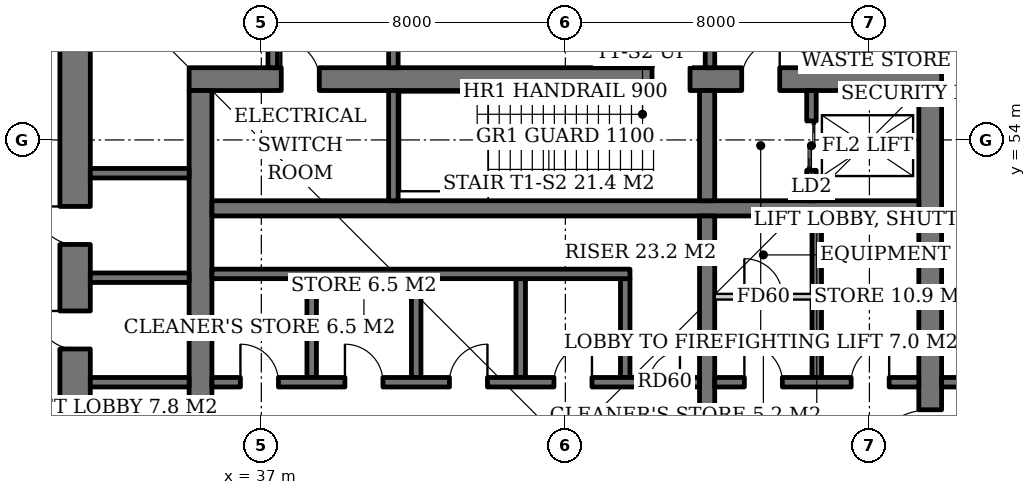
"""IFC4 building model, lengths in metres.
Left out: names, types, materials, properties, quantities, classifications, styles, units other than length and angle.
Written with IfcOpenShell. Run it as: python <this file> out.ifc"""

import sys

from ifc_helpers import new_model, si_unit, direction, frame, frame_2d, origin, place, context, subcontext, project, spatial, rectangle, extrude, element, fill, save


model = new_model("IFC4")
c1 = context("Model", 3, precision=1e-05, world=origin(), true_north=direction((0.0, 1.0)))
c2 = subcontext(c1, "Body", "Model", "MODEL_VIEW")
j1 = project(units=[si_unit("LENGTHUNIT", "METRE"), si_unit("PLANEANGLEUNIT", "RADIAN")], contexts=[c1])
p1 = place(None, origin())
s1 = spatial("IfcSite", under=j1, at=p1, CompositionType="ELEMENT")
p2 = place(p1, origin())
s2 = spatial("IfcBuilding", under=s1, at=p2, CompositionType="ELEMENT")
p3 = place(p2, frame((0.0, 0.0, -10.0)))
s3 = spatial("IfcBuildingStorey", under=s2, at=p3, CompositionType="ELEMENT", Elevation=-10.0)
p4 = place(p3, frame((35.1, 55.6, 0.0), z_axis=(0.0, 0.0, 1.0), x_axis=(1.0, 0.0, 0.0)))
e1 = element("IfcWall", 1, at=p4, inside=s3, PredefinedType="SHEAR", context=c2, shape_type="SweptSolid", body=[
    extrude(rectangle(XDim=19.8, YDim=0.6, at=frame_2d((9.9, 0.0))), origin(), (0.0, 0.0, 1.0), 5.0),
])
p5 = place(p4, frame((14.54, 0.0, 0.0)))
e2 = element("IfcOpeningElement", 2, at=p5, cuts=e1, PredefinedType="OPENING", context=c2, shape_type="SweptSolid", body=[
    extrude(rectangle(XDim=1.0, YDim=2.1, at=frame_2d((0.5, 1.05))), frame((0.0, 0.31, 0.0), z_axis=(0.0, -1.0, 0.0), x_axis=(1.0, 0.0, 0.0)), (0.0, 0.0, 1.0), 0.62),
])
p6 = place(p4, frame((12.18, 0.0, 0.0)))
e3 = element("IfcOpeningElement", 3, at=p6, cuts=e1, PredefinedType="OPENING", context=c2, shape_type="SweptSolid", body=[
    extrude(rectangle(XDim=1.0, YDim=2.1, at=frame_2d((0.5, 1.05))), frame((0.0, 0.31, 0.0), z_axis=(0.0, -1.0, 0.0), x_axis=(1.0, 0.0, 0.0)), (0.0, 0.0, 1.0), 0.62),
])
p7 = place(p4, frame((2.425, 0.0, 0.0)))
e4 = element("IfcOpeningElement", 4, at=p7, cuts=e1, PredefinedType="OPENING", context=c2, shape_type="SweptSolid", body=[
    extrude(rectangle(XDim=1.0, YDim=2.1, at=frame_2d((0.5, 1.05))), frame((0.0, 0.31, 0.0), z_axis=(0.0, -1.0, 0.0), x_axis=(1.0, 0.0, 0.0)), (0.0, 0.0, 1.0), 0.62),
])
p8 = place(p3, frame((35.4, 36.7, 0.0), z_axis=(0.0, 0.0, 1.0), x_axis=(0.0, 1.0, 0.0)))
e5 = element("IfcWall", 5, at=p8, inside=s3, PredefinedType="SHEAR", context=c2, shape_type="SweptSolid", body=[
    extrude(rectangle(XDim=18.6, YDim=0.6, at=frame_2d((9.3, 0.0))), origin(), (0.0, 0.0, 1.0), 5.0),
])
p9 = place(p8, frame((8.4, 0.0, 0.0)))
e6 = element("IfcOpeningElement", 6, at=p9, cuts=e5, PredefinedType="OPENING", context=c2, shape_type="SweptSolid", body=[
    extrude(rectangle(XDim=1.8, YDim=2.4, at=frame_2d((0.9, 1.2))), frame((0.0, 0.31, 0.0), z_axis=(0.0, -1.0, 0.0), x_axis=(1.0, 0.0, 0.0)), (0.0, 0.0, 1.0), 0.62),
])
p10 = place(p3, frame((54.6, 36.7, 0.0), z_axis=(0.0, 0.0, 1.0), x_axis=(0.0, 1.0, 0.0)))
e7 = element("IfcWall", 7, at=p10, inside=s3, PredefinedType="SHEAR", context=c2, shape_type="SweptSolid", body=[
    extrude(rectangle(XDim=18.6, YDim=0.6, at=frame_2d((9.3, 0.0))), origin(), (0.0, 0.0, 1.0), 5.0),
])
p11 = place(p10, frame((8.4, 0.0, 0.0)))
e8 = element("IfcOpeningElement", 8, at=p11, cuts=e7, PredefinedType="OPENING", context=c2, shape_type="SweptSolid", body=[
    extrude(rectangle(XDim=1.8, YDim=2.4, at=frame_2d((0.9, 1.2))), frame((0.0, 0.31, 0.0), z_axis=(0.0, -1.0, 0.0), x_axis=(1.0, 0.0, 0.0)), (0.0, 0.0, 1.0), 0.62),
])
p12 = place(p3, frame((32.1, 33.5, 0.0), z_axis=(0.0, 0.0, 1.0), x_axis=(0.0, 1.0, 0.0)))
e9 = element("IfcWall", 9, at=p12, inside=s3, PredefinedType="SHEAR", context=c2, shape_type="SweptSolid", body=[
    extrude(rectangle(XDim=25.0, YDim=0.8, at=frame_2d((12.5, 0.0))), origin(), (0.0, 0.0, 1.0), 5.0),
])
p13 = place(p12, frame((11.6, 0.0, 0.0)))
e10 = element("IfcOpeningElement", 10, at=p13, cuts=e9, PredefinedType="OPENING", context=c2, shape_type="SweptSolid", body=[
    extrude(rectangle(XDim=1.8, YDim=2.4, at=frame_2d((0.9, 1.2))), frame((0.0, 0.41, 0.0), z_axis=(0.0, -1.0, 0.0), x_axis=(1.0, 0.0, 0.0)), (0.0, 0.0, 1.0), 0.82),
])
p14 = place(p12, frame((3.5, 0.0, 0.0)))
e11 = element("IfcOpeningElement", 11, at=p14, cuts=e9, PredefinedType="OPENING", context=c2, shape_type="SweptSolid", body=[
    extrude(rectangle(XDim=1.0, YDim=2.1, at=frame_2d((0.5, 1.05))), frame((0.0, 0.41, 0.0), z_axis=(0.0, -1.0, 0.0), x_axis=(1.0, 0.0, 0.0)), (0.0, 0.0, 1.0), 0.82),
])
p15 = place(p12, frame((6.25, 0.0, 0.0)))
e12 = element("IfcOpeningElement", 12, at=p15, cuts=e9, PredefinedType="OPENING", context=c2, shape_type="SweptSolid", body=[
    extrude(rectangle(XDim=1.0, YDim=2.1, at=frame_2d((0.5, 1.05))), frame((0.0, 0.41, 0.0), z_axis=(0.0, -1.0, 0.0), x_axis=(1.0, 0.0, 0.0)), (0.0, 0.0, 1.0), 0.82),
])
p16 = place(p12, frame((9.0, 0.0, 0.0)))
e13 = element("IfcOpeningElement", 13, at=p16, cuts=e9, PredefinedType="OPENING", context=c2, shape_type="SweptSolid", body=[
    extrude(rectangle(XDim=1.0, YDim=2.1, at=frame_2d((0.5, 1.05))), frame((0.0, 0.41, 0.0), z_axis=(0.0, -1.0, 0.0), x_axis=(1.0, 0.0, 0.0)), (0.0, 0.0, 1.0), 0.82),
])
p17 = place(p12, frame((15.0, 0.0, 0.0)))
e14 = element("IfcOpeningElement", 14, at=p17, cuts=e9, PredefinedType="OPENING", context=c2, shape_type="SweptSolid", body=[
    extrude(rectangle(XDim=1.0, YDim=2.1, at=frame_2d((0.5, 1.05))), frame((0.0, 0.41, 0.0), z_axis=(0.0, -1.0, 0.0), x_axis=(1.0, 0.0, 0.0)), (0.0, 0.0, 1.0), 0.82),
])
p18 = place(p12, frame((17.75, 0.0, 0.0)))
e15 = element("IfcOpeningElement", 15, at=p18, cuts=e9, PredefinedType="OPENING", context=c2, shape_type="SweptSolid", body=[
    extrude(rectangle(XDim=1.0, YDim=2.1, at=frame_2d((0.5, 1.05))), frame((0.0, 0.41, 0.0), z_axis=(0.0, -1.0, 0.0), x_axis=(1.0, 0.0, 0.0)), (0.0, 0.0, 1.0), 0.82),
])
p19 = place(p3, frame((35.7, 52.2, 0.0), z_axis=(0.0, 0.0, 1.0), x_axis=(1.0, 0.0, 0.0)))
e16 = element("IfcWall", 16, at=p19, inside=s3, PredefinedType="SHEAR", context=c2, shape_type="SweptSolid", body=[
    extrude(rectangle(XDim=18.6, YDim=0.4, at=frame_2d((9.3, 0.0))), origin(), (0.0, 0.0, 1.0), 5.0),
])
p20 = place(p3, frame((48.73, 40.0, 0.0), z_axis=(0.0, 0.0, 1.0), x_axis=(0.0, 1.0, 0.0)))
e17 = element("IfcWall", 17, at=p20, inside=s3, PredefinedType="SHEAR", context=c2, shape_type="SweptSolid", body=[
    extrude(rectangle(XDim=12.0, YDim=0.4, at=frame_2d((6.0, 0.0))), origin(), (0.0, 0.0, 1.0), 5.0),
])
p21 = place(p3, frame((48.73, 52.4, 0.0), z_axis=(0.0, 0.0, 1.0), x_axis=(0.0, 1.0, 0.0)))
e18 = element("IfcWall", 18, at=p21, inside=s3, PredefinedType="SHEAR", context=c2, shape_type="SweptSolid", body=[
    extrude(rectangle(XDim=2.9, YDim=0.4, at=frame_2d((1.45, 0.0))), origin(), (0.0, 0.0, 1.0), 5.0),
])
p22 = place(p3, frame((40.475, 52.4, 0.0), z_axis=(0.0, 0.0, 1.0), x_axis=(0.0, 1.0, 0.0)))
e19 = element("IfcWall", 19, at=p22, inside=s3, PredefinedType="SHEAR", context=c2, shape_type="SweptSolid", body=[
    extrude(rectangle(XDim=2.9, YDim=0.25, at=frame_2d((1.45, 0.0))), origin(), (0.0, 0.0, 1.0), 5.0),
])
p23 = place(p3, frame((51.475, 52.4, 0.0), z_axis=(0.0, 0.0, 1.0), x_axis=(0.0, 1.0, 0.0)))
e20 = element("IfcWall", 20, at=p23, inside=s3, PredefinedType="SHEAR", context=c2, shape_type="SweptSolid", body=[
    extrude(rectangle(XDim=2.9, YDim=0.25, at=frame_2d((1.45, 0.0))), origin(), (0.0, 0.0, 1.0), 5.0),
])
p24 = place(p23, frame((0.8, 0.0, 0.0)))
e21 = element("IfcOpeningElement", 21, at=p24, cuts=e20, PredefinedType="OPENING", context=c2, shape_type="SweptSolid", body=[
    extrude(rectangle(XDim=1.3, YDim=2.2, at=frame_2d((0.65, 1.1))), frame((0.0, 0.135, 0.0), z_axis=(0.0, -1.0, 0.0), x_axis=(1.0, 0.0, 0.0)), (0.0, 0.0, 1.0), 0.27),
])
for number, where, z_axis, x_axis in (
    (22, (38.325, 47.75, 0.0), (0.0, 0.0, 1.0), (0.0, 1.0, 0.0)),
    (23, (41.075, 47.75, 0.0), (0.0, 0.0, 1.0), (0.0, 1.0, 0.0)),
    (24, (43.825, 47.75, 0.0), (0.0, 0.0, 1.0), (0.0, 1.0, 0.0)),
    (25, (46.575, 47.75, 0.0), (0.0, 0.0, 1.0), (0.0, 1.0, 0.0)),
):
    element("IfcWall", number, at=place(p3, frame(where, z_axis=z_axis, x_axis=x_axis)), inside=s3, PredefinedType="SHEAR", context=c2, shape_type="SweptSolid", body=[
        extrude(rectangle(XDim=2.6, YDim=0.25, at=frame_2d((1.3, 0.0))), origin(), (0.0, 0.0, 1.0), 5.0),
    ])
p25 = place(p3, frame((35.7, 50.475, 0.0), z_axis=(0.0, 0.0, 1.0), x_axis=(1.0, 0.0, 0.0)))
e26 = element("IfcWall", 26, at=p25, inside=s3, PredefinedType="SHEAR", context=c2, shape_type="SweptSolid", body=[
    extrude(rectangle(XDim=11.0, YDim=0.25, at=frame_2d((5.5, 0.0))), origin(), (0.0, 0.0, 1.0), 5.0),
])
p26 = place(p3, frame((35.7, 47.625, 0.0), z_axis=(0.0, 0.0, 1.0), x_axis=(1.0, 0.0, 0.0)))
e27 = element("IfcWall", 27, at=p26, inside=s3, PredefinedType="SHEAR", context=c2, shape_type="SweptSolid", body=[
    extrude(rectangle(XDim=12.83, YDim=0.25, at=frame_2d((6.415, 0.0))), origin(), (0.0, 0.0, 1.0), 5.0),
])
p27 = place(p26, frame((0.75, 0.0, 0.0)))
e28 = element("IfcOpeningElement", 28, at=p27, cuts=e27, PredefinedType="OPENING", context=c2, shape_type="SweptSolid", body=[
    extrude(rectangle(XDim=1.0, YDim=2.1, at=frame_2d((0.5, 1.05))), frame((0.0, 0.135, 0.0), z_axis=(0.0, -1.0, 0.0), x_axis=(1.0, 0.0, 0.0)), (0.0, 0.0, 1.0), 0.27),
])
p28 = place(p26, frame((3.5, 0.0, 0.0)))
e29 = element("IfcOpeningElement", 29, at=p28, cuts=e27, PredefinedType="OPENING", context=c2, shape_type="SweptSolid", body=[
    extrude(rectangle(XDim=1.0, YDim=2.1, at=frame_2d((0.5, 1.05))), frame((0.0, 0.135, 0.0), z_axis=(0.0, -1.0, 0.0), x_axis=(1.0, 0.0, 0.0)), (0.0, 0.0, 1.0), 0.27),
])
p29 = place(p26, frame((6.25, 0.0, 0.0)))
e30 = element("IfcOpeningElement", 30, at=p29, cuts=e27, PredefinedType="OPENING", context=c2, shape_type="SweptSolid", body=[
    extrude(rectangle(XDim=1.0, YDim=2.1, at=frame_2d((0.5, 1.05))), frame((0.0, 0.135, 0.0), z_axis=(0.0, -1.0, 0.0), x_axis=(1.0, 0.0, 0.0)), (0.0, 0.0, 1.0), 0.27),
])
p30 = place(p26, frame((9.0, 0.0, 0.0)))
e31 = element("IfcOpeningElement", 31, at=p30, cuts=e27, PredefinedType="OPENING", context=c2, shape_type="SweptSolid", body=[
    extrude(rectangle(XDim=1.0, YDim=2.1, at=frame_2d((0.5, 1.05))), frame((0.0, 0.135, 0.0), z_axis=(0.0, -1.0, 0.0), x_axis=(1.0, 0.0, 0.0)), (0.0, 0.0, 1.0), 0.27),
])
p31 = place(p26, frame((11.515, 0.0, 0.0)))
e32 = element("IfcOpeningElement", 32, at=p31, cuts=e27, PredefinedType="OPENING", context=c2, shape_type="SweptSolid", body=[
    extrude(rectangle(XDim=0.8, YDim=2.0, at=frame_2d((0.4, 1.0))), frame((0.0, 0.135, 0.0), z_axis=(0.0, -1.0, 0.0), x_axis=(1.0, 0.0, 0.0)), (0.0, 0.0, 1.0), 0.27),
])
p32 = place(p3, frame((51.615, 47.75, 0.0), z_axis=(0.0, 0.0, 1.0), x_axis=(0.0, 1.0, 0.0)))
e33 = element("IfcWall", 33, at=p32, inside=s3, PredefinedType="SHEAR", context=c2, shape_type="SweptSolid", body=[
    extrude(rectangle(XDim=4.25, YDim=0.25, at=frame_2d((2.125, 0.0))), origin(), (0.0, 0.0, 1.0), 5.0),
])
p33 = place(p3, frame((48.93, 47.625, 0.0), z_axis=(0.0, 0.0, 1.0), x_axis=(1.0, 0.0, 0.0)))
e34 = element("IfcWall", 34, at=p33, inside=s3, PredefinedType="SHEAR", context=c2, shape_type="SweptSolid", body=[
    extrude(rectangle(XDim=5.37, YDim=0.25, at=frame_2d((2.685, 0.0))), origin(), (0.0, 0.0, 1.0), 5.0),
])
p34 = place(p33, frame((0.78, 0.0, 0.0)))
e35 = element("IfcOpeningElement", 35, at=p34, cuts=e34, PredefinedType="OPENING", context=c2, shape_type="SweptSolid", body=[
    extrude(rectangle(XDim=1.0, YDim=2.1, at=frame_2d((0.5, 1.05))), frame((0.0, 0.135, 0.0), z_axis=(0.0, -1.0, 0.0), x_axis=(1.0, 0.0, 0.0)), (0.0, 0.0, 1.0), 0.27),
])
p35 = place(p33, frame((3.59, 0.0, 0.0)))
e36 = element("IfcOpeningElement", 36, at=p35, cuts=e34, PredefinedType="OPENING", context=c2, shape_type="SweptSolid", body=[
    extrude(rectangle(XDim=1.0, YDim=2.1, at=frame_2d((0.5, 1.05))), frame((0.0, 0.135, 0.0), z_axis=(0.0, -1.0, 0.0), x_axis=(1.0, 0.0, 0.0)), (0.0, 0.0, 1.0), 0.27),
])
for number, where, z_axis, x_axis in (
    (37, (32.5, 47.625, 0.0), (0.0, 0.0, 1.0), (1.0, 0.0, 0.0)),
    (38, (32.5, 50.375, 0.0), (0.0, 0.0, 1.0), (1.0, 0.0, 0.0)),
    (39, (32.5, 53.125, 0.0), (0.0, 0.0, 1.0), (1.0, 0.0, 0.0)),
):
    element("IfcWall", number, at=place(p3, frame(where, z_axis=z_axis, x_axis=x_axis)), inside=s3, PredefinedType="SHEAR", context=c2, shape_type="SweptSolid", body=[
        extrude(rectangle(XDim=2.6, YDim=0.25, at=frame_2d((1.3, 0.0))), origin(), (0.0, 0.0, 1.0), 5.0),
    ])
for number, where, z_axis, x_axis in (
    (40, (48.805, 55.9, 0.0), (0.0, 0.0, 1.0), (0.0, 1.0, 0.0)),
    (41, (51.475, 55.9, 0.0), (0.0, 0.0, 1.0), (0.0, 1.0, 0.0)),
    (42, (54.9, 47.625, 0.0), (0.0, 0.0, 1.0), (1.0, 0.0, 0.0)),
    (43, (40.475, 55.9, 0.0), (0.0, 0.0, 1.0), (0.0, 1.0, 0.0)),
    (44, (37.3, 55.9, 0.0), (0.0, 0.0, 1.0), (0.0, 1.0, 0.0)),
):
    element("IfcWall", number, at=place(p3, frame(where, z_axis=z_axis, x_axis=x_axis)), inside=s3, PredefinedType="SOLIDWALL", context=c2, shape_type="SweptSolid", body=[
        extrude(rectangle(XDim=2.6, YDim=0.25, at=frame_2d((1.3, 0.0))), origin(), (0.0, 0.0, 1.0), 4.7),
    ])
p36 = place(p3, frame((48.93, 49.875, 0.0), z_axis=(0.0, 0.0, 1.0), x_axis=(1.0, 0.0, 0.0)))
e45 = element("IfcWall", 45, at=p36, inside=s3, PredefinedType="SOLIDWALL", context=c2, shape_type="SweptSolid", body=[
    extrude(rectangle(XDim=2.56, YDim=0.15, at=frame_2d((1.28, 0.0))), origin(), (0.0, 0.0, 1.0), 4.7),
])
p37 = place(p36, frame((0.78, 0.0, 0.0)))
e46 = element("IfcOpeningElement", 46, at=p37, cuts=e45, PredefinedType="OPENING", context=c2, shape_type="SweptSolid", body=[
    extrude(rectangle(XDim=1.0, YDim=2.1, at=frame_2d((0.5, 1.05))), frame((0.0, 0.085, 0.0), z_axis=(0.0, -1.0, 0.0), x_axis=(1.0, 0.0, 0.0)), (0.0, 0.0, 1.0), 0.17),
])
p38 = place(p3, frame((54.55, 55.9, 0.0), z_axis=(0.0, 0.0, 1.0), x_axis=(0.0, 1.0, 0.0)))
e47 = element("IfcWall", 47, at=p38, inside=s3, PredefinedType="SOLIDWALL", context=c2, shape_type="SweptSolid", body=[
    extrude(rectangle(XDim=2.6, YDim=0.15, at=frame_2d((1.3, 0.0))), origin(), (0.0, 0.0, 1.0), 4.7),
])
p39 = place(p24, origin())
e48 = element("IfcDoor", 48, at=p39, inside=s3, OperationType="DOUBLE_DOOR_SLIDING", PredefinedType="DOOR", context=c2, shape_type="SweptSolid", body=[
    extrude(rectangle(XDim=1.3, YDim=2.2, at=frame_2d((0.65, 1.1))), frame((0.0, 0.025, 0.0), z_axis=(0.0, -1.0, 0.0), x_axis=(1.0, 0.0, 0.0)), (0.0, 0.0, 1.0), 0.05),
])
fill(e21, e48)
p40 = place(p27, origin())
e49 = element("IfcDoor", 49, at=p40, inside=s3, OperationType="SINGLE_SWING_LEFT", PredefinedType="DOOR", context=c2, shape_type="SweptSolid", body=[
    extrude(rectangle(XDim=1.0, YDim=2.1, at=frame_2d((0.5, 1.05))), frame((0.0, 0.025, 0.0), z_axis=(0.0, -1.0, 0.0), x_axis=(1.0, 0.0, 0.0)), (0.0, 0.0, 1.0), 0.05),
])
fill(e28, e49)
p41 = place(p28, origin())
e50 = element("IfcDoor", 50, at=p41, inside=s3, OperationType="SINGLE_SWING_LEFT", PredefinedType="DOOR", context=c2, shape_type="SweptSolid", body=[
    extrude(rectangle(XDim=1.0, YDim=2.1, at=frame_2d((0.5, 1.05))), frame((0.0, 0.025, 0.0), z_axis=(0.0, -1.0, 0.0), x_axis=(1.0, 0.0, 0.0)), (0.0, 0.0, 1.0), 0.05),
])
fill(e29, e50)
p42 = place(p29, origin())
e51 = element("IfcDoor", 51, at=p42, inside=s3, OperationType="SINGLE_SWING_RIGHT", PredefinedType="DOOR", context=c2, shape_type="SweptSolid", body=[
    extrude(rectangle(XDim=1.0, YDim=2.1, at=frame_2d((0.5, 1.05))), frame((0.0, 0.025, 0.0), z_axis=(0.0, -1.0, 0.0), x_axis=(1.0, 0.0, 0.0)), (0.0, 0.0, 1.0), 0.05),
])
fill(e30, e51)
p43 = place(p30, origin())
e52 = element("IfcDoor", 52, at=p43, inside=s3, OperationType="SINGLE_SWING_RIGHT", PredefinedType="DOOR", context=c2, shape_type="SweptSolid", body=[
    extrude(rectangle(XDim=1.0, YDim=2.1, at=frame_2d((0.5, 1.05))), frame((0.0, 0.025, 0.0), z_axis=(0.0, -1.0, 0.0), x_axis=(1.0, 0.0, 0.0)), (0.0, 0.0, 1.0), 0.05),
])
fill(e31, e52)
p44 = place(p31, origin())
e53 = element("IfcDoor", 53, at=p44, inside=s3, OperationType="SINGLE_SWING_RIGHT", PredefinedType="DOOR", context=c2, shape_type="SweptSolid", body=[
    extrude(rectangle(XDim=0.8, YDim=2.0, at=frame_2d((0.4, 1.0))), frame((0.0, 0.025, 0.0), z_axis=(0.0, -1.0, 0.0), x_axis=(1.0, 0.0, 0.0)), (0.0, 0.0, 1.0), 0.05),
])
fill(e32, e53)
p45 = place(p34, origin())
e54 = element("IfcDoor", 54, at=p45, inside=s3, OperationType="SINGLE_SWING_LEFT", PredefinedType="DOOR", context=c2, shape_type="SweptSolid", body=[
    extrude(rectangle(XDim=1.0, YDim=2.1, at=frame_2d((0.5, 1.05))), frame((0.0, 0.025, 0.0), z_axis=(0.0, -1.0, 0.0), x_axis=(1.0, 0.0, 0.0)), (0.0, 0.0, 1.0), 0.05),
])
fill(e35, e54)
p46 = place(p35, origin())
e55 = element("IfcDoor", 55, at=p46, inside=s3, OperationType="SINGLE_SWING_RIGHT", PredefinedType="DOOR", context=c2, shape_type="SweptSolid", body=[
    extrude(rectangle(XDim=1.0, YDim=2.1, at=frame_2d((0.5, 1.05))), frame((0.0, 0.025, 0.0), z_axis=(0.0, -1.0, 0.0), x_axis=(1.0, 0.0, 0.0)), (0.0, 0.0, 1.0), 0.05),
])
fill(e36, e55)
p47 = place(p37, origin())
e56 = element("IfcDoor", 56, at=p47, inside=s3, OperationType="SINGLE_SWING_LEFT", PredefinedType="DOOR", context=c2, shape_type="SweptSolid", body=[
    extrude(rectangle(XDim=1.0, YDim=2.1, at=frame_2d((0.5, 1.05))), frame((0.0, 0.025, 0.0), z_axis=(0.0, -1.0, 0.0), x_axis=(1.0, 0.0, 0.0)), (0.0, 0.0, 1.0), 0.05),
])
fill(e46, e56)
p48 = place(p5, origin())
e57 = element("IfcDoor", 57, at=p48, inside=s3, OperationType="SINGLE_SWING_RIGHT", PredefinedType="DOOR", context=c2, shape_type="SweptSolid", body=[
    extrude(rectangle(XDim=1.0, YDim=2.1, at=frame_2d((0.5, 1.05))), frame((0.0, 0.025, 0.0), z_axis=(0.0, -1.0, 0.0), x_axis=(1.0, 0.0, 0.0)), (0.0, 0.0, 1.0), 0.05),
])
fill(e2, e57)
p49 = place(p9, origin())
e58 = element("IfcDoor", 58, at=p49, inside=s3, OperationType="DOUBLE_DOOR_SINGLE_SWING", PredefinedType="DOOR", context=c2, shape_type="SweptSolid", body=[
    extrude(rectangle(XDim=1.8, YDim=2.4, at=frame_2d((0.9, 1.2))), frame((0.0, 0.025, 0.0), z_axis=(0.0, -1.0, 0.0), x_axis=(1.0, 0.0, 0.0)), (0.0, 0.0, 1.0), 0.05),
])
fill(e6, e58)
p50 = place(p11, origin())
e59 = element("IfcDoor", 59, at=p50, inside=s3, OperationType="DOUBLE_DOOR_SINGLE_SWING", PredefinedType="DOOR", context=c2, shape_type="SweptSolid", body=[
    extrude(rectangle(XDim=1.8, YDim=2.4, at=frame_2d((0.9, 1.2))), frame((0.0, 0.025, 0.0), z_axis=(0.0, -1.0, 0.0), x_axis=(1.0, 0.0, 0.0)), (0.0, 0.0, 1.0), 0.05),
])
fill(e8, e59)
p51 = place(p6, origin())
e60 = element("IfcDoor", 60, at=p51, inside=s3, OperationType="SINGLE_SWING_RIGHT", PredefinedType="DOOR", context=c2, shape_type="SweptSolid", body=[
    extrude(rectangle(XDim=1.0, YDim=2.1, at=frame_2d((0.5, 1.05))), frame((0.0, 0.025, 0.0), z_axis=(0.0, -1.0, 0.0), x_axis=(1.0, 0.0, 0.0)), (0.0, 0.0, 1.0), 0.05),
])
fill(e3, e60)
p52 = place(p13, origin())
e61 = element("IfcDoor", 61, at=p52, inside=s3, OperationType="DOUBLE_DOOR_SINGLE_SWING", PredefinedType="DOOR", context=c2, shape_type="SweptSolid", body=[
    extrude(rectangle(XDim=1.8, YDim=2.4, at=frame_2d((0.9, 1.2))), frame((0.0, 0.025, 0.0), z_axis=(0.0, -1.0, 0.0), x_axis=(1.0, 0.0, 0.0)), (0.0, 0.0, 1.0), 0.05),
])
fill(e10, e61)
p53 = place(p7, origin())
e62 = element("IfcDoor", 62, at=p53, inside=s3, OperationType="SINGLE_SWING_LEFT", PredefinedType="DOOR", context=c2, shape_type="SweptSolid", body=[
    extrude(rectangle(XDim=1.0, YDim=2.1, at=frame_2d((0.5, 1.05))), frame((0.0, -0.24, 0.0), z_axis=(0.0, -1.0, 0.0), x_axis=(1.0, 0.0, 0.0)), (0.0, 0.0, 1.0), 0.05),
])
fill(e4, e62)
p54 = place(p17, origin())
e63 = element("IfcDoor", 63, at=p54, inside=s3, OperationType="SINGLE_SWING_RIGHT", PredefinedType="DOOR", context=c2, shape_type="SweptSolid", body=[
    extrude(rectangle(XDim=1.0, YDim=2.1, at=frame_2d((0.5, 1.05))), frame((0.0, -0.34, 0.0), z_axis=(0.0, -1.0, 0.0), x_axis=(1.0, 0.0, 0.0)), (0.0, 0.0, 1.0), 0.05),
])
fill(e14, e63)
p55 = place(p18, origin())
e64 = element("IfcDoor", 64, at=p55, inside=s3, OperationType="SINGLE_SWING_RIGHT", PredefinedType="DOOR", context=c2, shape_type="SweptSolid", body=[
    extrude(rectangle(XDim=1.0, YDim=2.1, at=frame_2d((0.5, 1.05))), frame((0.0, -0.34, 0.0), z_axis=(0.0, -1.0, 0.0), x_axis=(1.0, 0.0, 0.0)), (0.0, 0.0, 1.0), 0.05),
])
fill(e15, e64)
save(model, sys.argv[1])
